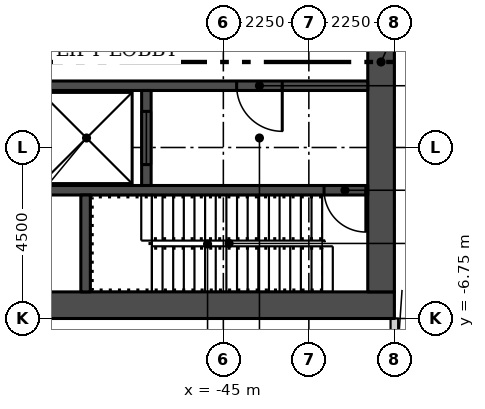
"""IFC4 building model, lengths in metres.
Left out: names, types, materials, properties, quantities, classifications, styles, units other than length and angle.
Written with IfcOpenShell. Run it as: python <this file> out.ifc"""

import sys

from ifc_helpers import new_model, si_unit, direction, frame, frame_2d, origin, place, context, subcontext, project, spatial, rectangle, extrude, element, fill, save


model = new_model("IFC4")
c1 = context("Model", 3, precision=1e-05, world=origin(), true_north=direction((0.0, 1.0)))
c2 = subcontext(c1, "Body", "Model", "MODEL_VIEW")
j1 = project(units=[si_unit("LENGTHUNIT", "METRE"), si_unit("PLANEANGLEUNIT", "RADIAN")], contexts=[c1])
p1 = place(None, origin())
s1 = spatial("IfcSite", under=j1, at=p1, CompositionType="ELEMENT")
p2 = place(p1, origin())
s2 = spatial("IfcBuilding", under=s1, at=p2, CompositionType="ELEMENT")
p3 = place(p2, frame((0.0, 0.0, 12.5)))
s3 = spatial("IfcBuildingStorey", under=s2, at=p3, CompositionType="ELEMENT", Elevation=12.5)
p4 = place(p3, frame((-40.5, -6.75, 0.0), z_axis=(0.0, 0.0, 1.0), x_axis=(0.0, -1.0, 0.0)))
e1 = element("IfcWall", 1, at=p4, inside=s3, PredefinedType="PARTITIONING", context=c2, shape_type="SweptSolid", body=[
    extrude(rectangle(XDim=4.4, YDim=0.2, at=frame_2d((2.2, 0.0))), origin(), (0.0, 0.0, 1.0), 5.6),
])
p5 = place(p4, frame((2.1, 0.0, 0.0)))
e2 = element("IfcOpeningElement", 2, at=p5, cuts=e1, PredefinedType="OPENING", context=c2, shape_type="SweptSolid", body=[
    extrude(rectangle(XDim=1.5, YDim=2.1, at=frame_2d((0.75, 1.05))), frame((0.0, 0.11, 0.0), z_axis=(0.0, -1.0, 0.0), x_axis=(1.0, 0.0, 0.0)), (0.0, 0.0, 1.0), 0.22),
])
p6 = place(p3, frame((-40.5, -6.4, 0.0), z_axis=(0.0, 0.0, 1.0), x_axis=(-1.0, 0.0, 0.0)))
e3 = element("IfcWall", 3, at=p6, inside=s3, PredefinedType="SHEAR", context=c2, shape_type="SweptSolid", body=[
    extrude(rectangle(XDim=13.5, YDim=0.7, at=frame_2d((6.75, 0.0))), origin(), (0.0, 0.0, 1.0), 5.6),
])
p7 = place(p3, frame((-40.85, -6.05, 0.0), z_axis=(0.0, 0.0, 1.0), x_axis=(0.0, 1.0, 0.0)))
e4 = element("IfcWall", 4, at=p7, inside=s3, PredefinedType="SHEAR", context=c2, shape_type="SweptSolid", body=[
    extrude(rectangle(XDim=12.1, YDim=0.7, at=frame_2d((6.05, 0.0))), origin(), (0.0, 0.0, 1.0), 5.6),
])
p8 = place(p7, frame((6.4, 0.0, 0.0)))
e5 = element("IfcOpeningElement", 5, at=p8, cuts=e4, PredefinedType="OPENING", context=c2, shape_type="SweptSolid", body=[
    extrude(rectangle(XDim=1.8, YDim=2.4, at=frame_2d((0.9, 1.2))), frame((0.0, 0.36, 0.0), z_axis=(0.0, -1.0, 0.0), x_axis=(1.0, 0.0, 0.0)), (0.0, 0.0, 1.0), 0.72),
])
p9 = place(p3, frame((-41.2, -3.375, 0.0), z_axis=(0.0, 0.0, 1.0), x_axis=(-1.0, 0.0, 0.0)))
e6 = element("IfcWall", 6, at=p9, inside=s3, PredefinedType="SHEAR", context=c2, shape_type="SweptSolid", body=[
    extrude(rectangle(XDim=12.1, YDim=0.25, at=frame_2d((6.05, 0.0))), origin(), (0.0, 0.0, 1.0), 5.6),
])
p10 = place(p9, frame((0.05, 0.0, 0.0)))
e7 = element("IfcOpeningElement", 7, at=p10, cuts=e6, PredefinedType="OPENING", context=c2, shape_type="SweptSolid", body=[
    extrude(rectangle(XDim=1.1, YDim=2.1, at=frame_2d((0.55, 1.05))), frame((0.0, 0.135, 0.0), z_axis=(0.0, -1.0, 0.0), x_axis=(1.0, 0.0, 0.0)), (0.0, 0.0, 1.0), 0.27),
])
p11 = place(p3, frame((-48.625, -6.05, 0.0), z_axis=(0.0, 0.0, 1.0), x_axis=(0.0, 1.0, 0.0)))
e8 = element("IfcWall", 8, at=p11, inside=s3, PredefinedType="SHEAR", context=c2, shape_type="SweptSolid", body=[
    extrude(rectangle(XDim=2.55, YDim=0.25, at=frame_2d((1.275, 0.0))), origin(), (0.0, 0.0, 1.0), 5.6),
])
p12 = place(p3, frame((-41.2, -0.625, 0.0), z_axis=(0.0, 0.0, 1.0), x_axis=(-1.0, 0.0, 0.0)))
e9 = element("IfcWall", 9, at=p12, inside=s3, PredefinedType="SHEAR", context=c2, shape_type="SweptSolid", body=[
    extrude(rectangle(XDim=12.1, YDim=0.25, at=frame_2d((6.05, 0.0))), origin(), (0.0, 0.0, 1.0), 5.6),
])
p13 = place(p12, frame((2.25, 0.0, 0.0)))
e10 = element("IfcOpeningElement", 10, at=p13, cuts=e9, PredefinedType="OPENING", context=c2, shape_type="SweptSolid", body=[
    extrude(rectangle(XDim=1.2, YDim=2.1, at=frame_2d((0.6, 1.05))), frame((0.0, 0.135, 0.0), z_axis=(0.0, -1.0, 0.0), x_axis=(1.0, 0.0, 0.0)), (0.0, 0.0, 1.0), 0.27),
])
p14 = place(p12, frame((10.025, 0.0, 0.0)))
e11 = element("IfcOpeningElement", 11, at=p14, cuts=e9, PredefinedType="OPENING", context=c2, shape_type="SweptSolid", body=[
    extrude(rectangle(XDim=0.9, YDim=2.1, at=frame_2d((0.45, 1.05))), frame((0.0, 0.135, 0.0), z_axis=(0.0, -1.0, 0.0), x_axis=(1.0, 0.0, 0.0)), (0.0, 0.0, 1.0), 0.27),
])
p15 = place(p3, frame((-47.025, -3.25, 0.0), z_axis=(0.0, 0.0, 1.0), x_axis=(0.0, 1.0, 0.0)))
e12 = element("IfcWall", 12, at=p15, inside=s3, PredefinedType="SHEAR", context=c2, shape_type="SweptSolid", body=[
    extrude(rectangle(XDim=2.5, YDim=0.25, at=frame_2d((1.25, 0.0))), origin(), (0.0, 0.0, 1.0), 5.6),
])
p16 = place(p15, frame((0.55, 0.0, 0.0)))
e13 = element("IfcOpeningElement", 13, at=p16, cuts=e12, PredefinedType="OPENING", context=c2, shape_type="SweptSolid", body=[
    extrude(rectangle(XDim=1.4, YDim=2.4, at=frame_2d((0.7, 1.2))), frame((0.0, 0.135, 0.0), z_axis=(0.0, -1.0, 0.0), x_axis=(1.0, 0.0, 0.0)), (0.0, 0.0, 1.0), 0.27),
])
p17 = place(p10, origin())
e14 = element("IfcDoor", 14, at=p17, inside=s3, OperationType="SINGLE_SWING_LEFT", PredefinedType="DOOR", context=c2, shape_type="SweptSolid", body=[
    extrude(rectangle(XDim=1.1, YDim=2.1, at=frame_2d((0.55, 1.05))), frame((0.0, 0.025, 0.0), z_axis=(0.0, -1.0, 0.0), x_axis=(1.0, 0.0, 0.0)), (0.0, 0.0, 1.0), 0.05),
])
fill(e7, e14)
p18 = place(p13, origin())
e15 = element("IfcDoor", 15, at=p18, inside=s3, OperationType="SINGLE_SWING_LEFT", PredefinedType="DOOR", context=c2, shape_type="SweptSolid", body=[
    extrude(rectangle(XDim=1.2, YDim=2.1, at=frame_2d((0.6, 1.05))), frame((0.0, 0.025, 0.0), z_axis=(0.0, -1.0, 0.0), x_axis=(1.0, 0.0, 0.0)), (0.0, 0.0, 1.0), 0.05),
])
fill(e10, e15)
p19 = place(p16, origin())
e16 = element("IfcDoor", 16, at=p19, inside=s3, OperationType="SLIDING_TO_LEFT", PredefinedType="DOOR", context=c2, shape_type="SweptSolid", body=[
    extrude(rectangle(XDim=1.4, YDim=2.4, at=frame_2d((0.7, 1.2))), frame((0.0, 0.025, 0.0), z_axis=(0.0, -1.0, 0.0), x_axis=(1.0, 0.0, 0.0)), (0.0, 0.0, 1.0), 0.05),
])
fill(e13, e16)
save(model, sys.argv[1])
